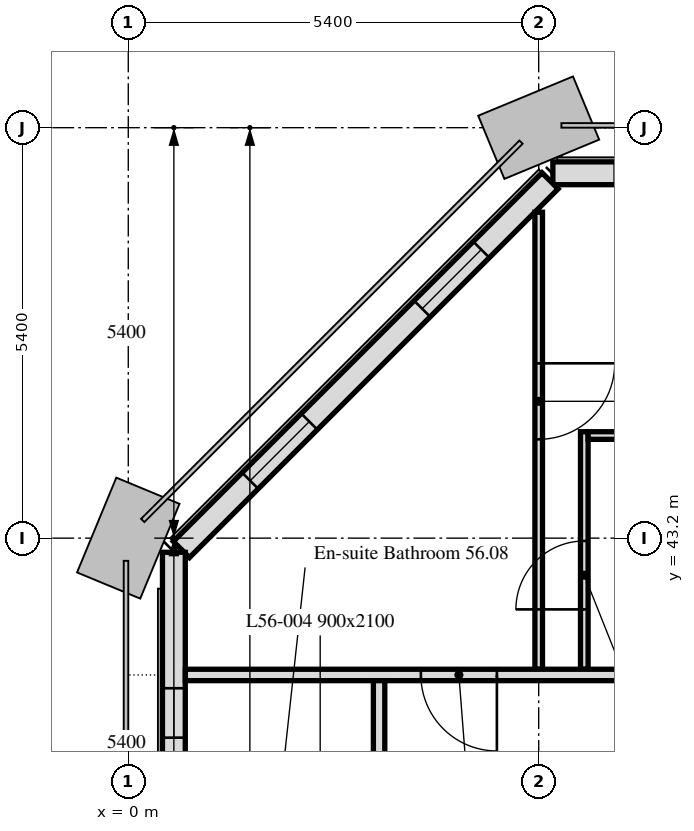
"""IFC4 building model, lengths in metres.
Left out: names, types, materials, properties, quantities, classifications, styles, units other than length and angle.
Written with IfcOpenShell. Run it as: python <this file> out.ifc"""

import sys

from ifc_helpers import new_model, si_unit, direction, frame, frame_2d, origin, place, context, subcontext, project, spatial, rectangle, extrude, element, fill, save


model = new_model("IFC4")
c1 = context("Model", 3, precision=1e-05, world=origin(), true_north=direction((0.0, 1.0)))
c2 = subcontext(c1, "Body", "Model", "MODEL_VIEW")
j1 = project(units=[si_unit("LENGTHUNIT", "METRE"), si_unit("PLANEANGLEUNIT", "RADIAN")], contexts=[c1])
p1 = place(None, origin())
s1 = spatial("IfcSite", under=j1, at=p1, CompositionType="ELEMENT")
p2 = place(p1, origin())
s2 = spatial("IfcBuilding", under=s1, at=p2, CompositionType="ELEMENT")
p3 = place(p2, frame((0.0, 0.0, 223.6)))
s3 = spatial("IfcBuildingStorey", under=s2, at=p3, CompositionType="ELEMENT", Elevation=223.6)
p4 = place(p3, frame((37.614, 48.0, 0.0), z_axis=(0.0, 0.0, 1.0), x_axis=(-1.0, 0.0, 0.0)))
e1 = element("IfcWall", 1, at=p4, inside=s3, PredefinedType="SOLIDWALL", context=c2, shape_type="SweptSolid", body=[
    extrude(rectangle(XDim=32.027, YDim=0.3, at=frame_2d((16.014, 0.0))), origin(), (0.0, 0.0, 1.0), 3.0),
])
p5 = place(p4, frame((2.764, 0.0, 0.9)))
e2 = element("IfcOpeningElement", 2, at=p5, cuts=e1, PredefinedType="OPENING", context=c2, shape_type="SweptSolid", body=[
    extrude(rectangle(XDim=1.1, YDim=1.7, at=frame_2d((0.55, 0.85))), frame((0.0, 0.16, 0.0), z_axis=(0.0, -1.0, 0.0), x_axis=(1.0, 0.0, 0.0)), (0.0, 0.0, 1.0), 0.32),
])
p6 = place(p4, frame((6.214, 0.0, 0.9)))
e3 = element("IfcOpeningElement", 3, at=p6, cuts=e1, PredefinedType="OPENING", context=c2, shape_type="SweptSolid", body=[
    extrude(rectangle(XDim=3.4, YDim=1.7, at=frame_2d((1.7, 0.85))), frame((0.0, 0.16, 0.0), z_axis=(0.0, -1.0, 0.0), x_axis=(1.0, 0.0, 0.0)), (0.0, 0.0, 1.0), 0.32),
])
p7 = place(p4, frame((13.564, 0.0, 0.9)))
e4 = element("IfcOpeningElement", 4, at=p7, cuts=e1, PredefinedType="OPENING", context=c2, shape_type="SweptSolid", body=[
    extrude(rectangle(XDim=1.1, YDim=1.7, at=frame_2d((0.55, 0.85))), frame((0.0, 0.16, 0.0), z_axis=(0.0, -1.0, 0.0), x_axis=(1.0, 0.0, 0.0)), (0.0, 0.0, 1.0), 0.32),
])
p8 = place(p4, frame((17.014, 0.0, 0.9)))
e5 = element("IfcOpeningElement", 5, at=p8, cuts=e1, PredefinedType="OPENING", context=c2, shape_type="SweptSolid", body=[
    extrude(rectangle(XDim=3.4, YDim=1.7, at=frame_2d((1.7, 0.85))), frame((0.0, 0.16, 0.0), z_axis=(0.0, -1.0, 0.0), x_axis=(1.0, 0.0, 0.0)), (0.0, 0.0, 1.0), 0.32),
])
p9 = place(p4, frame((24.364, 0.0, 0.9)))
e6 = element("IfcOpeningElement", 6, at=p9, cuts=e1, PredefinedType="OPENING", context=c2, shape_type="SweptSolid", body=[
    extrude(rectangle(XDim=1.1, YDim=1.7, at=frame_2d((0.55, 0.85))), frame((0.0, 0.16, 0.0), z_axis=(0.0, -1.0, 0.0), x_axis=(1.0, 0.0, 0.0)), (0.0, 0.0, 1.0), 0.32),
])
p10 = place(p4, frame((27.814, 0.0, 0.9)))
e7 = element("IfcOpeningElement", 7, at=p10, cuts=e1, PredefinedType="OPENING", context=c2, shape_type="SweptSolid", body=[
    extrude(rectangle(XDim=3.4, YDim=1.7, at=frame_2d((1.7, 0.85))), frame((0.0, 0.16, 0.0), z_axis=(0.0, -1.0, 0.0), x_axis=(1.0, 0.0, 0.0)), (0.0, 0.0, 1.0), 0.32),
])
p11 = place(p3, frame((5.55, 47.901, 0.0), z_axis=(0.0, 0.0, 1.0), x_axis=(-0.707106781187, -0.707106781187, 0.0)))
e8 = element("IfcWall", 8, at=p11, inside=s3, PredefinedType="SOLIDWALL", context=c2, shape_type="SweptSolid", body=[
    extrude(rectangle(XDim=6.86, YDim=0.3, at=frame_2d((3.43, 0.0))), origin(), (0.0, 0.0, 1.0), 3.0),
])
p12 = place(p11, frame((1.28, 0.0, 0.9)))
e9 = element("IfcOpeningElement", 9, at=p12, cuts=e8, PredefinedType="OPENING", context=c2, shape_type="SweptSolid", body=[
    extrude(rectangle(XDim=1.1, YDim=1.7, at=frame_2d((0.55, 0.85))), frame((0.0, 0.16, 0.0), z_axis=(0.0, -1.0, 0.0), x_axis=(1.0, 0.0, 0.0)), (0.0, 0.0, 1.0), 0.32),
])
p13 = place(p11, frame((4.48, 0.0, 0.9)))
e10 = element("IfcOpeningElement", 10, at=p13, cuts=e8, PredefinedType="OPENING", context=c2, shape_type="SweptSolid", body=[
    extrude(rectangle(XDim=1.1, YDim=1.7, at=frame_2d((0.55, 0.85))), frame((0.0, 0.16, 0.0), z_axis=(0.0, -1.0, 0.0), x_axis=(1.0, 0.0, 0.0)), (0.0, 0.0, 1.0), 0.32),
])
p14 = place(p3, frame((0.6, 43.014, 0.0), z_axis=(0.0, 0.0, 1.0), x_axis=(0.0, -1.0, 0.0)))
e11 = element("IfcWall", 11, at=p14, inside=s3, PredefinedType="SOLIDWALL", context=c2, shape_type="SweptSolid", body=[
    extrude(rectangle(XDim=32.027, YDim=0.3, at=frame_2d((16.014, 0.0))), origin(), (0.0, 0.0, 1.0), 3.0),
])
p15 = place(p14, frame((1.789, 0.0, 0.9)))
e12 = element("IfcOpeningElement", 12, at=p15, cuts=e11, PredefinedType="OPENING", context=c2, shape_type="SweptSolid", body=[
    extrude(rectangle(XDim=0.65, YDim=1.7, at=frame_2d((0.325, 0.85))), frame((0.0, 0.16, 0.0), z_axis=(0.0, -1.0, 0.0), x_axis=(1.0, 0.0, 0.0)), (0.0, 0.0, 1.0), 0.32),
])
p16 = place(p14, frame((2.764, 0.0, 0.9)))
e13 = element("IfcOpeningElement", 13, at=p16, cuts=e11, PredefinedType="OPENING", context=c2, shape_type="SweptSolid", body=[
    extrude(rectangle(XDim=1.1, YDim=1.7, at=frame_2d((0.55, 0.85))), frame((0.0, 0.16, 0.0), z_axis=(0.0, -1.0, 0.0), x_axis=(1.0, 0.0, 0.0)), (0.0, 0.0, 1.0), 0.32),
])
p17 = place(p14, frame((6.214, 0.0, 0.9)))
e14 = element("IfcOpeningElement", 14, at=p17, cuts=e11, PredefinedType="OPENING", context=c2, shape_type="SweptSolid", body=[
    extrude(rectangle(XDim=3.4, YDim=1.7, at=frame_2d((1.7, 0.85))), frame((0.0, 0.16, 0.0), z_axis=(0.0, -1.0, 0.0), x_axis=(1.0, 0.0, 0.0)), (0.0, 0.0, 1.0), 0.32),
])
p18 = place(p14, frame((11.964, 0.0, 0.9)))
e15 = element("IfcOpeningElement", 15, at=p18, cuts=e11, PredefinedType="OPENING", context=c2, shape_type="SweptSolid", body=[
    extrude(rectangle(XDim=1.1, YDim=1.7, at=frame_2d((0.55, 0.85))), frame((0.0, 0.16, 0.0), z_axis=(0.0, -1.0, 0.0), x_axis=(1.0, 0.0, 0.0)), (0.0, 0.0, 1.0), 0.32),
])
p19 = place(p14, frame((13.564, 0.0, 0.9)))
e16 = element("IfcOpeningElement", 16, at=p19, cuts=e11, PredefinedType="OPENING", context=c2, shape_type="SweptSolid", body=[
    extrude(rectangle(XDim=1.1, YDim=1.7, at=frame_2d((0.55, 0.85))), frame((0.0, 0.16, 0.0), z_axis=(0.0, -1.0, 0.0), x_axis=(1.0, 0.0, 0.0)), (0.0, 0.0, 1.0), 0.32),
])
p20 = place(p14, frame((17.364, 0.0, 0.9)))
e17 = element("IfcOpeningElement", 17, at=p20, cuts=e11, PredefinedType="OPENING", context=c2, shape_type="SweptSolid", body=[
    extrude(rectangle(XDim=1.1, YDim=1.7, at=frame_2d((0.55, 0.85))), frame((0.0, 0.16, 0.0), z_axis=(0.0, -1.0, 0.0), x_axis=(1.0, 0.0, 0.0)), (0.0, 0.0, 1.0), 0.32),
])
p21 = place(p14, frame((18.964, 0.0, 0.9)))
e18 = element("IfcOpeningElement", 18, at=p21, cuts=e11, PredefinedType="OPENING", context=c2, shape_type="SweptSolid", body=[
    extrude(rectangle(XDim=1.1, YDim=1.7, at=frame_2d((0.55, 0.85))), frame((0.0, 0.16, 0.0), z_axis=(0.0, -1.0, 0.0), x_axis=(1.0, 0.0, 0.0)), (0.0, 0.0, 1.0), 0.32),
])
p22 = place(p14, frame((22.764, 0.0, 0.9)))
e19 = element("IfcOpeningElement", 19, at=p22, cuts=e11, PredefinedType="OPENING", context=c2, shape_type="SweptSolid", body=[
    extrude(rectangle(XDim=1.1, YDim=1.7, at=frame_2d((0.55, 0.85))), frame((0.0, 0.16, 0.0), z_axis=(0.0, -1.0, 0.0), x_axis=(1.0, 0.0, 0.0)), (0.0, 0.0, 1.0), 0.32),
])
p23 = place(p14, frame((24.364, 0.0, 0.9)))
e20 = element("IfcOpeningElement", 20, at=p23, cuts=e11, PredefinedType="OPENING", context=c2, shape_type="SweptSolid", body=[
    extrude(rectangle(XDim=1.1, YDim=1.7, at=frame_2d((0.55, 0.85))), frame((0.0, 0.16, 0.0), z_axis=(0.0, -1.0, 0.0), x_axis=(1.0, 0.0, 0.0)), (0.0, 0.0, 1.0), 0.32),
])
p24 = place(p14, frame((27.814, 0.0, 0.9)))
e21 = element("IfcOpeningElement", 21, at=p24, cuts=e11, PredefinedType="OPENING", context=c2, shape_type="SweptSolid", body=[
    extrude(rectangle(XDim=3.4, YDim=1.7, at=frame_2d((1.7, 0.85))), frame((0.0, 0.16, 0.0), z_axis=(0.0, -1.0, 0.0), x_axis=(1.0, 0.0, 0.0)), (0.0, 0.0, 1.0), 0.32),
])
p25 = place(p3, frame((5.4, 47.488, 0.0), z_axis=(0.0, 0.0, 1.0), x_axis=(0.0, -1.0, 0.0)))
e22 = element("IfcWall", 22, at=p25, inside=s3, PredefinedType="PARTITIONING", context=c2, shape_type="SweptSolid", body=[
    extrude(rectangle(XDim=6.013, YDim=0.1, at=frame_2d((3.006, 0.0))), origin(), (0.0, 0.0, 1.0), 3.0),
])
p26 = place(p25, frame((1.988, 0.0, 0.0)))
e23 = element("IfcOpeningElement", 23, at=p26, cuts=e22, PredefinedType="OPENING", context=c2, shape_type="SweptSolid", body=[
    extrude(rectangle(XDim=1.0, YDim=2.1, at=frame_2d((0.5, 1.05))), frame((0.0, 0.05, 0.0), z_axis=(0.0, -1.0, 0.0), x_axis=(1.0, 0.0, 0.0)), (0.0, 0.0, 1.0), 0.1),
])
p27 = place(p3, frame((6.0, 41.475, 0.0), z_axis=(0.0, 0.0, 1.0), x_axis=(0.0, 1.0, 0.0)))
e24 = element("IfcWall", 24, at=p27, inside=s3, PredefinedType="PARTITIONING", context=c2, shape_type="SweptSolid", body=[
    extrude(rectangle(XDim=3.125, YDim=0.1, at=frame_2d((1.562, 0.0))), origin(), (0.0, 0.0, 1.0), 3.0),
])
p28 = place(p27, frame((0.788, 0.0, 0.0)))
e25 = element("IfcOpeningElement", 25, at=p28, cuts=e24, PredefinedType="OPENING", context=c2, shape_type="SweptSolid", body=[
    extrude(rectangle(XDim=0.9, YDim=2.1, at=frame_2d((0.45, 1.05))), frame((0.0, 0.05, 0.0), z_axis=(0.0, -1.0, 0.0), x_axis=(1.0, 0.0, 0.0)), (0.0, 0.0, 1.0), 0.1),
])
p29 = place(p3, frame((6.05, 44.55, 0.0), z_axis=(0.0, 0.0, 1.0), x_axis=(1.0, 0.0, 0.0)))
e26 = element("IfcWall", 26, at=p29, inside=s3, PredefinedType="PARTITIONING", context=c2, shape_type="SweptSolid", body=[
    extrude(rectangle(XDim=2.4, YDim=0.1, at=frame_2d((1.2, 0.0))), origin(), (0.0, 0.0, 1.0), 3.0),
])
p30 = place(p3, frame((42.449, 41.4, 0.0), z_axis=(0.0, 0.0, 1.0), x_axis=(-1.0, 0.0, 0.0)))
e27 = element("IfcWall", 27, at=p30, inside=s3, PredefinedType="PARTITIONING", context=c2, shape_type="SweptSolid", body=[
    extrude(rectangle(XDim=41.698, YDim=0.15, at=frame_2d((20.849, 0.0))), origin(), (0.0, 0.0, 1.0), 2.4),
])
p31 = place(p30, frame((1.449, 0.0, 0.0)))
e28 = element("IfcOpeningElement", 28, at=p31, cuts=e27, PredefinedType="OPENING", context=c2, shape_type="SweptSolid", body=[
    extrude(rectangle(XDim=1.0, YDim=2.1, at=frame_2d((0.5, 1.05))), frame((0.0, 0.075, 0.0), z_axis=(0.0, -1.0, 0.0), x_axis=(1.0, 0.0, 0.0)), (0.0, 0.0, 1.0), 0.15),
])
p32 = place(p30, frame((29.249, 0.0, 0.0)))
e29 = element("IfcOpeningElement", 29, at=p32, cuts=e27, PredefinedType="OPENING", context=c2, shape_type="SweptSolid", body=[
    extrude(rectangle(XDim=1.0, YDim=2.1, at=frame_2d((0.5, 1.05))), frame((0.0, 0.075, 0.0), z_axis=(0.0, -1.0, 0.0), x_axis=(1.0, 0.0, 0.0)), (0.0, 0.0, 1.0), 0.15),
])
p33 = place(p30, frame((37.599, 0.0, 0.0)))
e30 = element("IfcOpeningElement", 30, at=p33, cuts=e27, PredefinedType="OPENING", context=c2, shape_type="SweptSolid", body=[
    extrude(rectangle(XDim=1.0, YDim=2.1, at=frame_2d((0.5, 1.05))), frame((0.0, 0.075, 0.0), z_axis=(0.0, -1.0, 0.0), x_axis=(1.0, 0.0, 0.0)), (0.0, 0.0, 1.0), 0.15),
])
p34 = place(p30, frame((17.649, 0.0, 0.0)))
e31 = element("IfcOpeningElement", 31, at=p34, cuts=e27, PredefinedType="OPENING", context=c2, shape_type="SweptSolid", body=[
    extrude(rectangle(XDim=1.0, YDim=2.1, at=frame_2d((0.5, 1.05))), frame((0.0, 0.075, 0.0), z_axis=(0.0, -1.0, 0.0), x_axis=(1.0, 0.0, 0.0)), (0.0, 0.0, 1.0), 0.15),
])
p35 = place(p3, frame((3.3, 11.325, 0.0), z_axis=(0.0, 0.0, 1.0), x_axis=(0.0, 1.0, 0.0)))
e32 = element("IfcWall", 32, at=p35, inside=s3, PredefinedType="PARTITIONING", context=c2, shape_type="SweptSolid", body=[
    extrude(rectangle(XDim=30.0, YDim=0.15, at=frame_2d((15.0, 0.0))), origin(), (0.0, 0.0, 1.0), 2.4),
])
p36 = place(p35, frame((17.875, 0.0, 0.0)))
e33 = element("IfcOpeningElement", 33, at=p36, cuts=e32, PredefinedType="OPENING", context=c2, shape_type="SweptSolid", body=[
    extrude(rectangle(XDim=1.0, YDim=2.1, at=frame_2d((0.5, 1.05))), frame((0.0, 0.075, 0.0), z_axis=(0.0, -1.0, 0.0), x_axis=(1.0, 0.0, 0.0)), (0.0, 0.0, 1.0), 0.15),
])
p37 = place(p35, frame((1.9, 0.0, 0.0)))
e34 = element("IfcOpeningElement", 34, at=p37, cuts=e32, PredefinedType="OPENING", context=c2, shape_type="SweptSolid", body=[
    extrude(rectangle(XDim=1.0, YDim=2.1, at=frame_2d((0.5, 1.05))), frame((0.0, 0.075, 0.0), z_axis=(0.0, -1.0, 0.0), x_axis=(1.0, 0.0, 0.0)), (0.0, 0.0, 1.0), 0.15),
])
p38 = place(p35, frame((23.725, 0.0, 0.0)))
e35 = element("IfcOpeningElement", 35, at=p38, cuts=e32, PredefinedType="OPENING", context=c2, shape_type="SweptSolid", body=[
    extrude(rectangle(XDim=1.0, YDim=2.1, at=frame_2d((0.5, 1.05))), frame((0.0, 0.075, 0.0), z_axis=(0.0, -1.0, 0.0), x_axis=(1.0, 0.0, 0.0)), (0.0, 0.0, 1.0), 0.15),
])
p39 = place(p35, frame((8.425, 0.0, 0.0)))
e36 = element("IfcOpeningElement", 36, at=p39, cuts=e32, PredefinedType="OPENING", context=c2, shape_type="SweptSolid", body=[
    extrude(rectangle(XDim=1.0, YDim=2.1, at=frame_2d((0.5, 1.05))), frame((0.0, 0.075, 0.0), z_axis=(0.0, -1.0, 0.0), x_axis=(1.0, 0.0, 0.0)), (0.0, 0.0, 1.0), 0.15),
])
p40 = place(p12, origin())
e37 = element("IfcWindow", 37, at=p40, inside=s3, PartitioningType="SINGLE_PANEL", PredefinedType="WINDOW", context=c2, shape_type="SweptSolid", body=[
    extrude(rectangle(XDim=1.1, YDim=1.7, at=frame_2d((0.55, 0.85))), frame((0.0, 0.03, 0.0), z_axis=(0.0, -1.0, 0.0), x_axis=(1.0, 0.0, 0.0)), (0.0, 0.0, 1.0), 0.06),
])
fill(e9, e37)
p41 = place(p13, origin())
e38 = element("IfcWindow", 38, at=p41, inside=s3, PartitioningType="SINGLE_PANEL", PredefinedType="WINDOW", context=c2, shape_type="SweptSolid", body=[
    extrude(rectangle(XDim=1.1, YDim=1.7, at=frame_2d((0.55, 0.85))), frame((0.0, 0.03, 0.0), z_axis=(0.0, -1.0, 0.0), x_axis=(1.0, 0.0, 0.0)), (0.0, 0.0, 1.0), 0.06),
])
fill(e10, e38)
p42 = place(p15, origin())
e39 = element("IfcWindow", 39, at=p42, inside=s3, PartitioningType="SINGLE_PANEL", PredefinedType="WINDOW", context=c2, shape_type="SweptSolid", body=[
    extrude(rectangle(XDim=0.65, YDim=1.7, at=frame_2d((0.325, 0.85))), frame((0.0, 0.03, 0.0), z_axis=(0.0, -1.0, 0.0), x_axis=(1.0, 0.0, 0.0)), (0.0, 0.0, 1.0), 0.06),
])
fill(e12, e39)
p43 = place(p28, origin())
e40 = element("IfcDoor", 40, at=p43, inside=s3, OperationType="SINGLE_SWING_LEFT", PredefinedType="DOOR", context=c2, shape_type="SweptSolid", body=[
    extrude(rectangle(XDim=0.9, YDim=2.1, at=frame_2d((0.45, 1.05))), frame((0.0, 0.025, 0.0), z_axis=(0.0, -1.0, 0.0), x_axis=(1.0, 0.0, 0.0)), (0.0, 0.0, 1.0), 0.05),
])
fill(e25, e40)
p44 = place(p26, origin())
e41 = element("IfcDoor", 41, at=p44, inside=s3, OperationType="SINGLE_SWING_LEFT", PredefinedType="DOOR", context=c2, shape_type="SweptSolid", body=[
    extrude(rectangle(XDim=1.0, YDim=2.1, at=frame_2d((0.5, 1.05))), frame((0.0, 0.025, 0.0), z_axis=(0.0, -1.0, 0.0), x_axis=(1.0, 0.0, 0.0)), (0.0, 0.0, 1.0), 0.05),
])
fill(e23, e41)
p45 = place(p33, origin())
e42 = element("IfcDoor", 42, at=p45, inside=s3, OperationType="SINGLE_SWING_LEFT", PredefinedType="DOOR", context=c2, shape_type="SweptSolid", body=[
    extrude(rectangle(XDim=1.0, YDim=2.1, at=frame_2d((0.5, 1.05))), frame((0.0, 0.025, 0.0), z_axis=(0.0, -1.0, 0.0), x_axis=(1.0, 0.0, 0.0)), (0.0, 0.0, 1.0), 0.05),
])
fill(e30, e42)
save(model, sys.argv[1])
